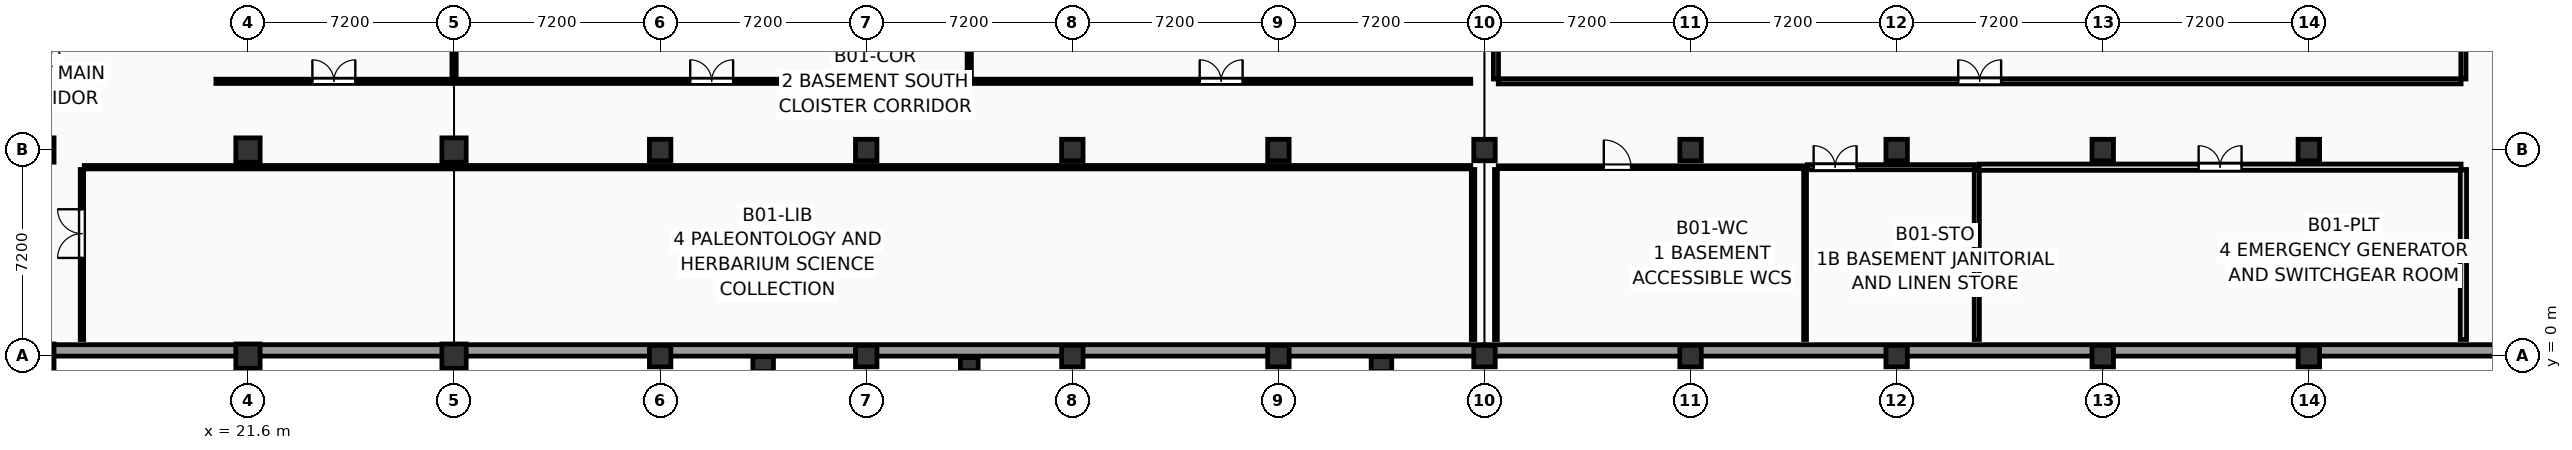
"""IFC4 building model, lengths in metres.
Left out: names, types, materials, properties, quantities, classifications, styles, units other than length and angle.
Written with IfcOpenShell. Run it as: python <this file> out.ifc"""

import sys

from ifc_helpers import new_model, si_unit, direction, frame, frame_2d, origin, origin_2d, place, context, subcontext, project, spatial, rectangle, extrude, element, fill, save


model = new_model("IFC4")
c1 = context("Model", 3, precision=1e-05, world=origin(), true_north=direction((0.0, 1.0)))
c2 = subcontext(c1, "Body", "Model", "MODEL_VIEW")
j1 = project(units=[si_unit("LENGTHUNIT", "METRE"), si_unit("PLANEANGLEUNIT", "RADIAN")], contexts=[c1])
p1 = place(None, origin())
s1 = spatial("IfcSite", under=j1, at=p1, CompositionType="ELEMENT")
p2 = place(p1, origin())
s2 = spatial("IfcBuilding", under=s1, at=p2, CompositionType="ELEMENT")
p3 = place(p2, frame((0.0, 0.0, -4.5)))
s3 = spatial("IfcBuildingStorey", under=s2, at=p3, CompositionType="ELEMENT", Elevation=-4.5)
for number, where, z_axis, x_axis in (
    (1, (14.4, 0.0, -0.3), (0.0, 0.0, 1.0), (1.0, 0.0, 0.0)),
    (2, (14.4, 7.2, -0.3), (0.0, 0.0, 1.0), (1.0, 0.0, 0.0)),
    (3, (21.6, 0.0, -0.3), (0.0, 0.0, 1.0), (1.0, 0.0, 0.0)),
    (4, (21.6, 7.2, -0.3), (0.0, 0.0, 1.0), (1.0, 0.0, 0.0)),
    (5, (28.8, 0.0, -0.3), (0.0, 0.0, 1.0), (1.0, 0.0, 0.0)),
    (6, (28.8, 7.2, -0.3), (0.0, 0.0, 1.0), (1.0, 0.0, 0.0)),
):
    element("IfcColumn", number, at=place(p3, frame(where, z_axis=z_axis, x_axis=x_axis)), inside=s3, PredefinedType="COLUMN", context=c2, shape_type="SweptSolid", body=[
        extrude(rectangle(XDim=0.85, YDim=0.85, at=origin_2d()), origin(), (0.0, 0.0, 1.0), 4.8),
    ])
for number, where, z_axis, x_axis in (
    (7, (36.0, 0.0, -0.3), (0.0, 0.0, 1.0), (1.0, 0.0, 0.0)),
    (8, (36.0, 7.2, -0.3), (0.0, 0.0, 1.0), (1.0, 0.0, 0.0)),
    (9, (43.2, 0.0, -0.3), (0.0, 0.0, 1.0), (1.0, 0.0, 0.0)),
    (10, (43.2, 7.2, -0.3), (0.0, 0.0, 1.0), (1.0, 0.0, 0.0)),
    (11, (50.4, 0.0, -0.3), (0.0, 0.0, 1.0), (1.0, 0.0, 0.0)),
    (12, (50.4, 7.2, -0.3), (0.0, 0.0, 1.0), (1.0, 0.0, 0.0)),
    (13, (57.6, 0.0, -0.3), (0.0, 0.0, 1.0), (1.0, 0.0, 0.0)),
    (14, (57.6, 7.2, -0.3), (0.0, 0.0, 1.0), (1.0, 0.0, 0.0)),
    (15, (64.8, 0.0, -0.3), (0.0, 0.0, 1.0), (1.0, 0.0, 0.0)),
    (16, (64.8, 7.2, -0.3), (0.0, 0.0, 1.0), (1.0, 0.0, 0.0)),
    (17, (72.0, 0.0, -0.3), (0.0, 0.0, 1.0), (1.0, 0.0, 0.0)),
    (18, (72.0, 7.2, -0.3), (0.0, 0.0, 1.0), (1.0, 0.0, 0.0)),
    (19, (79.2, 0.0, -0.3), (0.0, 0.0, 1.0), (1.0, 0.0, 0.0)),
    (20, (79.2, 7.2, -0.3), (0.0, 0.0, 1.0), (1.0, 0.0, 0.0)),
    (21, (86.4, 0.0, -0.3), (0.0, 0.0, 1.0), (1.0, 0.0, 0.0)),
    (22, (86.4, 7.2, -0.3), (0.0, 0.0, 1.0), (1.0, 0.0, 0.0)),
    (23, (93.6, 0.0, -0.3), (0.0, 0.0, 1.0), (1.0, 0.0, 0.0)),
    (24, (93.6, 7.2, -0.3), (0.0, 0.0, 1.0), (1.0, 0.0, 0.0)),
):
    element("IfcColumn", number, at=place(p3, frame(where, z_axis=z_axis, x_axis=x_axis)), inside=s3, PredefinedType="COLUMN", context=c2, shape_type="SweptSolid", body=[
        extrude(rectangle(XDim=0.75, YDim=0.75, at=origin_2d()), origin(), (0.0, 0.0, 1.0), 4.8),
    ])
p4 = place(p3, frame((39.6, -0.28, -0.3), z_axis=(0.0, 0.0, 1.0), x_axis=(0.0, 1.0, 0.0)))
e25 = element("IfcColumn", 25, at=p4, inside=s3, PredefinedType="PILASTER", context=c2, shape_type="SweptSolid", body=[
    extrude(rectangle(XDim=0.52, YDim=0.72, at=origin_2d()), origin(), (0.0, 0.0, 1.0), 4.8),
])
p5 = place(p3, frame((46.8, -0.28, -0.3), z_axis=(0.0, 0.0, 1.0), x_axis=(0.0, 1.0, 0.0)))
e26 = element("IfcColumn", 26, at=p5, inside=s3, PredefinedType="PILASTER", context=c2, shape_type="SweptSolid", body=[
    extrude(rectangle(XDim=0.46, YDim=0.62, at=origin_2d()), origin(), (0.0, 0.0, 1.0), 4.8),
])
p6 = place(p3, frame((61.2, -0.28, -0.3), z_axis=(0.0, 0.0, 1.0), x_axis=(0.0, 1.0, 0.0)))
e27 = element("IfcColumn", 27, at=p6, inside=s3, PredefinedType="PILASTER", context=c2, shape_type="SweptSolid", body=[
    extrude(rectangle(XDim=0.52, YDim=0.72, at=origin_2d()), origin(), (0.0, 0.0, 1.0), 4.8),
])
p7 = place(p3, frame((115.2, 0.2, -0.3), z_axis=(0.0, 0.0, 1.0), x_axis=(-1.0, 0.0, 0.0)))
e28 = element("IfcWall", 28, at=p7, inside=s3, PredefinedType="USERDEFINED", context=c2, shape_type="SweptSolid", body=[
    extrude(rectangle(XDim=50.4, YDim=0.4, at=frame_2d((25.2, 0.0))), origin(), (0.0, 0.0, 1.0), 4.54),
])
p8 = place(p3, frame((64.8, 0.2, -0.3), z_axis=(0.0, 0.0, 1.0), x_axis=(-1.0, 0.0, 0.0)))
e29 = element("IfcWall", 29, at=p8, inside=s3, PredefinedType="USERDEFINED", context=c2, shape_type="SweptSolid", body=[
    extrude(rectangle(XDim=36.0, YDim=0.4, at=frame_2d((18.0, 0.0))), origin(), (0.0, 0.0, 1.0), 4.54),
])
p9 = place(p3, frame((28.8, 0.2, -0.3), z_axis=(0.0, 0.0, 1.0), x_axis=(-1.0, 0.0, 0.0)))
e30 = element("IfcWall", 30, at=p9, inside=s3, PredefinedType="USERDEFINED", context=c2, shape_type="SweptSolid", body=[
    extrude(rectangle(XDim=28.8, YDim=0.4, at=frame_2d((14.4, 0.0))), origin(), (0.0, 0.0, 1.0), 4.54),
])
p10 = place(p3, frame((20.48, 9.6, 0.0), z_axis=(0.0, 0.0, 1.0), x_axis=(1.0, 0.0, 0.0)))
e31 = element("IfcWall", 31, at=p10, inside=s3, PredefinedType="PARTITIONING", context=c2, shape_type="SweptSolid", body=[
    extrude(rectangle(XDim=8.24, YDim=0.15, at=frame_2d((4.12, 0.0))), origin(), (0.0, 0.0, 1.0), 4.225),
])
p11 = place(p10, frame((3.37, 0.0, 0.0)))
e32 = element("IfcOpeningElement", 32, at=p11, cuts=e31, PredefinedType="OPENING", context=c2, shape_type="SweptSolid", body=[
    extrude(rectangle(XDim=1.5, YDim=2.2, at=frame_2d((0.75, 1.1))), frame((0.0, 0.087, 0.0), z_axis=(0.0, -1.0, 0.0), x_axis=(1.0, 0.0, 0.0)), (0.0, 0.0, 1.0), 0.174),
])
p12 = place(p3, frame((28.8, 9.68, 0.0), z_axis=(0.0, 0.0, 1.0), x_axis=(0.0, 1.0, 0.0)))
e33 = element("IfcWall", 33, at=p12, inside=s3, PredefinedType="PARTITIONING", context=c2, shape_type="SweptSolid", body=[
    extrude(rectangle(XDim=17.84, YDim=0.15, at=frame_2d((8.92, 0.0))), origin(), (0.0, 0.0, 1.0), 3.375),
])
p13 = place(p3, frame((28.88, 9.6, 0.0), z_axis=(0.0, 0.0, 1.0), x_axis=(1.0, 0.0, 0.0)))
e34 = element("IfcWall", 34, at=p13, inside=s3, PredefinedType="PARTITIONING", context=c2, shape_type="SweptSolid", body=[
    extrude(rectangle(XDim=17.84, YDim=0.15, at=frame_2d((8.92, 0.0))), origin(), (0.0, 0.0, 1.0), 4.225),
])
p14 = place(p13, frame((8.17, 0.0, 0.0)))
e35 = element("IfcOpeningElement", 35, at=p14, cuts=e34, PredefinedType="OPENING", context=c2, shape_type="SweptSolid", body=[
    extrude(rectangle(XDim=1.5, YDim=2.2, at=frame_2d((0.75, 1.1))), frame((0.0, 0.087, 0.0), z_axis=(0.0, -1.0, 0.0), x_axis=(1.0, 0.0, 0.0)), (0.0, 0.0, 1.0), 0.174),
])
p15 = place(p3, frame((46.8, 9.68, 0.0), z_axis=(0.0, 0.0, 1.0), x_axis=(0.0, 1.0, 0.0)))
e36 = element("IfcWall", 36, at=p15, inside=s3, PredefinedType="PARTITIONING", context=c2, shape_type="SweptSolid", body=[
    extrude(rectangle(XDim=33.44, YDim=0.15, at=frame_2d((16.72, 0.0))), origin(), (0.0, 0.0, 1.0), 4.225),
])
p16 = place(p3, frame((46.88, 9.6, 0.0), z_axis=(0.0, 0.0, 1.0), x_axis=(1.0, 0.0, 0.0)))
e37 = element("IfcWall", 37, at=p16, inside=s3, PredefinedType="PARTITIONING", context=c2, shape_type="SweptSolid", body=[
    extrude(rectangle(XDim=17.44, YDim=0.15, at=frame_2d((8.72, 0.0))), origin(), (0.0, 0.0, 1.0), 4.225),
])
p17 = place(p16, frame((7.97, 0.0, 0.0)))
e38 = element("IfcOpeningElement", 38, at=p17, cuts=e37, PredefinedType="OPENING", context=c2, shape_type="SweptSolid", body=[
    extrude(rectangle(XDim=1.5, YDim=2.2, at=frame_2d((0.75, 1.1))), frame((0.0, 0.087, 0.0), z_axis=(0.0, -1.0, 0.0), x_axis=(1.0, 0.0, 0.0)), (0.0, 0.0, 1.0), 0.174),
])
p18 = place(p3, frame((15.8, 0.58, 0.0), z_axis=(0.0, 0.0, 1.0), x_axis=(0.0, 1.0, 0.0)))
e39 = element("IfcWall", 39, at=p18, inside=s3, PredefinedType="PARTITIONING", context=c2, shape_type="SweptSolid", body=[
    extrude(rectangle(XDim=5.94, YDim=0.12, at=frame_2d((2.97, 0.0))), origin(), (0.0, 0.0, 1.0), 4.225),
])
p19 = place(p18, frame((2.851, 0.0, 0.0)))
e40 = element("IfcOpeningElement", 40, at=p19, cuts=e39, PredefinedType="OPENING", context=c2, shape_type="SweptSolid", body=[
    extrude(rectangle(XDim=1.7, YDim=2.28, at=frame_2d((0.85, 1.14))), frame((0.0, 0.072, 0.0), z_axis=(0.0, -1.0, 0.0), x_axis=(1.0, 0.0, 0.0)), (0.0, 0.0, 1.0), 0.144),
])
p20 = place(p3, frame((64.4, 0.58, 0.0), z_axis=(0.0, 0.0, 1.0), x_axis=(0.0, 1.0, 0.0)))
e41 = element("IfcWall", 41, at=p20, inside=s3, PredefinedType="PARTITIONING", context=c2, shape_type="SweptSolid", body=[
    extrude(rectangle(XDim=5.94, YDim=0.12, at=frame_2d((2.97, 0.0))), origin(), (0.0, 0.0, 1.0), 3.375),
])
p21 = place(p3, frame((15.88, 6.6, 0.0), z_axis=(0.0, 0.0, 1.0), x_axis=(1.0, 0.0, 0.0)))
e42 = element("IfcWall", 42, at=p21, inside=s3, PredefinedType="PARTITIONING", context=c2, shape_type="SweptSolid", body=[
    extrude(rectangle(XDim=48.44, YDim=0.12, at=frame_2d((24.22, 0.0))), origin(), (0.0, 0.0, 1.0), 4.225),
])
p22 = place(p3, frame((65.2, 9.68, 0.0), z_axis=(0.0, 0.0, 1.0), x_axis=(0.0, 1.0, 0.0)))
e43 = element("IfcWall", 43, at=p22, inside=s3, PredefinedType="PARTITIONING", context=c2, shape_type="SweptSolid", body=[
    extrude(rectangle(XDim=18.44, YDim=0.18, at=frame_2d((9.22, 0.0))), origin(), (0.0, 0.0, 1.0), 3.375),
])
p23 = place(p3, frame((65.28, 9.6, 0.0), z_axis=(0.0, 0.0, 1.0), x_axis=(1.0, 0.0, 0.0)))
e44 = element("IfcWall", 44, at=p23, inside=s3, PredefinedType="PARTITIONING", context=c2, shape_type="SweptSolid", body=[
    extrude(rectangle(XDim=33.64, YDim=0.18, at=frame_2d((16.82, 0.0))), origin(), (0.0, 0.0, 1.0), 4.225),
])
p24 = place(p23, frame((16.07, 0.0, 0.0)))
e45 = element("IfcOpeningElement", 45, at=p24, cuts=e44, PredefinedType="OPENING", context=c2, shape_type="SweptSolid", body=[
    extrude(rectangle(XDim=1.5, YDim=2.25, at=frame_2d((0.75, 1.125))), frame((0.0, 0.102, 0.0), z_axis=(0.0, -1.0, 0.0), x_axis=(1.0, 0.0, 0.0)), (0.0, 0.0, 1.0), 0.204),
])
p25 = place(p3, frame((99.0, 9.68, 0.0), z_axis=(0.0, 0.0, 1.0), x_axis=(0.0, 1.0, 0.0)))
e46 = element("IfcWall", 46, at=p25, inside=s3, PredefinedType="PARTITIONING", context=c2, shape_type="SweptSolid", body=[
    extrude(rectangle(XDim=18.44, YDim=0.18, at=frame_2d((9.22, 0.0))), origin(), (0.0, 0.0, 1.0), 4.225),
])
p26 = place(p3, frame((65.2, 0.58, 0.0), z_axis=(0.0, 0.0, 1.0), x_axis=(0.0, 1.0, 0.0)))
e47 = element("IfcWall", 47, at=p26, inside=s3, PredefinedType="PARTITIONING", context=c2, shape_type="SweptSolid", body=[
    extrude(rectangle(XDim=5.94, YDim=0.1, at=frame_2d((2.97, 0.0))), origin(), (0.0, 0.0, 1.0), 3.375),
])
p27 = place(p3, frame((76.0, 0.58, 0.0), z_axis=(0.0, 0.0, 1.0), x_axis=(0.0, 1.0, 0.0)))
e48 = element("IfcWall", 48, at=p27, inside=s3, PredefinedType="PARTITIONING", context=c2, shape_type="SweptSolid", body=[
    extrude(rectangle(XDim=5.94, YDim=0.1, at=frame_2d((2.97, 0.0))), origin(), (0.0, 0.0, 1.0), 4.225),
])
p28 = place(p3, frame((65.28, 6.6, 0.0), z_axis=(0.0, 0.0, 1.0), x_axis=(1.0, 0.0, 0.0)))
e49 = element("IfcWall", 49, at=p28, inside=s3, PredefinedType="PARTITIONING", context=c2, shape_type="SweptSolid", body=[
    extrude(rectangle(XDim=10.64, YDim=0.1, at=frame_2d((5.32, 0.0))), origin(), (0.0, 0.0, 1.0), 4.225),
])
p29 = place(p28, frame((3.689, 0.0, 0.0)))
e50 = element("IfcOpeningElement", 50, at=p29, cuts=e49, PredefinedType="OPENING", context=c2, shape_type="SweptSolid", body=[
    extrude(rectangle(XDim=0.95, YDim=2.1, at=frame_2d((0.475, 1.05))), frame((0.0, 0.062, 0.0), z_axis=(0.0, -1.0, 0.0), x_axis=(1.0, 0.0, 0.0)), (0.0, 0.0, 1.0), 0.124),
])
p30 = place(p3, frame((82.0, 0.58, 0.0), z_axis=(0.0, 0.0, 1.0), x_axis=(0.0, 1.0, 0.0)))
e51 = element("IfcWall", 51, at=p30, inside=s3, PredefinedType="PARTITIONING", context=c2, shape_type="SweptSolid", body=[
    extrude(rectangle(XDim=5.94, YDim=0.18, at=frame_2d((2.97, 0.0))), origin(), (0.0, 0.0, 1.0), 4.225),
])
p31 = place(p3, frame((76.08, 6.6, 0.0), z_axis=(0.0, 0.0, 1.0), x_axis=(1.0, 0.0, 0.0)))
e52 = element("IfcWall", 52, at=p31, inside=s3, PredefinedType="PARTITIONING", context=c2, shape_type="SweptSolid", body=[
    extrude(rectangle(XDim=5.84, YDim=0.18, at=frame_2d((2.92, 0.0))), origin(), (0.0, 0.0, 1.0), 4.225),
])
p32 = place(p31, frame((0.22, 0.0, 0.0)))
e53 = element("IfcOpeningElement", 53, at=p32, cuts=e52, PredefinedType="OPENING", context=c2, shape_type="SweptSolid", body=[
    extrude(rectangle(XDim=1.5, YDim=2.25, at=frame_2d((0.75, 1.125))), frame((0.0, 0.102, 0.0), z_axis=(0.0, -1.0, 0.0), x_axis=(1.0, 0.0, 0.0)), (0.0, 0.0, 1.0), 0.204),
])
p33 = place(p3, frame((99.0, 0.58, 0.0), z_axis=(0.0, 0.0, 1.0), x_axis=(0.0, 1.0, 0.0)))
e54 = element("IfcWall", 54, at=p33, inside=s3, PredefinedType="PARTITIONING", context=c2, shape_type="SweptSolid", body=[
    extrude(rectangle(XDim=5.94, YDim=0.22, at=frame_2d((2.97, 0.0))), origin(), (0.0, 0.0, 1.0), 4.225),
])
p34 = place(p3, frame((82.08, 6.6, 0.0), z_axis=(0.0, 0.0, 1.0), x_axis=(1.0, 0.0, 0.0)))
e55 = element("IfcWall", 55, at=p34, inside=s3, PredefinedType="PARTITIONING", context=c2, shape_type="SweptSolid", body=[
    extrude(rectangle(XDim=16.84, YDim=0.22, at=frame_2d((8.42, 0.0))), origin(), (0.0, 0.0, 1.0), 4.225),
])
p35 = place(p34, frame((7.67, 0.0, 0.0)))
e56 = element("IfcOpeningElement", 56, at=p35, cuts=e55, PredefinedType="OPENING", context=c2, shape_type="SweptSolid", body=[
    extrude(rectangle(XDim=1.5, YDim=2.25, at=frame_2d((0.75, 1.125))), frame((0.0, 0.122, 0.0), z_axis=(0.0, -1.0, 0.0), x_axis=(1.0, 0.0, 0.0)), (0.0, 0.0, 1.0), 0.244),
])
p36 = place(p11, origin())
e57 = element("IfcDoor", 57, at=p36, inside=s3, OperationType="DOUBLE_DOOR_SINGLE_SWING", PredefinedType="DOOR", context=c2, shape_type="SweptSolid", body=[
    extrude(rectangle(XDim=1.5, YDim=2.2, at=frame_2d((0.75, 1.1))), frame((0.0, 0.025, 0.0), z_axis=(0.0, -1.0, 0.0), x_axis=(1.0, 0.0, 0.0)), (0.0, 0.0, 1.0), 0.05),
])
fill(e32, e57)
p37 = place(p14, origin())
e58 = element("IfcDoor", 58, at=p37, inside=s3, OperationType="DOUBLE_DOOR_SINGLE_SWING", PredefinedType="DOOR", context=c2, shape_type="SweptSolid", body=[
    extrude(rectangle(XDim=1.5, YDim=2.2, at=frame_2d((0.75, 1.1))), frame((0.0, 0.025, 0.0), z_axis=(0.0, -1.0, 0.0), x_axis=(1.0, 0.0, 0.0)), (0.0, 0.0, 1.0), 0.05),
])
fill(e35, e58)
p38 = place(p17, origin())
e59 = element("IfcDoor", 59, at=p38, inside=s3, OperationType="DOUBLE_DOOR_SINGLE_SWING", PredefinedType="DOOR", context=c2, shape_type="SweptSolid", body=[
    extrude(rectangle(XDim=1.5, YDim=2.2, at=frame_2d((0.75, 1.1))), frame((0.0, 0.025, 0.0), z_axis=(0.0, -1.0, 0.0), x_axis=(1.0, 0.0, 0.0)), (0.0, 0.0, 1.0), 0.05),
])
fill(e38, e59)
p39 = place(p19, origin())
e60 = element("IfcDoor", 60, at=p39, inside=s3, OperationType="DOUBLE_DOOR_SINGLE_SWING", PredefinedType="DOOR", context=c2, shape_type="SweptSolid", body=[
    extrude(rectangle(XDim=1.7, YDim=2.28, at=frame_2d((0.85, 1.14))), frame((0.0, 0.025, 0.0), z_axis=(0.0, -1.0, 0.0), x_axis=(1.0, 0.0, 0.0)), (0.0, 0.0, 1.0), 0.05),
])
fill(e40, e60)
p40 = place(p24, origin())
e61 = element("IfcDoor", 61, at=p40, inside=s3, OperationType="DOUBLE_DOOR_SINGLE_SWING", PredefinedType="DOOR", context=c2, shape_type="SweptSolid", body=[
    extrude(rectangle(XDim=1.5, YDim=2.25, at=frame_2d((0.75, 1.125))), frame((0.0, 0.025, 0.0), z_axis=(0.0, -1.0, 0.0), x_axis=(1.0, 0.0, 0.0)), (0.0, 0.0, 1.0), 0.05),
])
fill(e45, e61)
p41 = place(p29, origin())
e62 = element("IfcDoor", 62, at=p41, inside=s3, OperationType="SINGLE_SWING_LEFT", PredefinedType="DOOR", context=c2, shape_type="SweptSolid", body=[
    extrude(rectangle(XDim=0.95, YDim=2.1, at=frame_2d((0.475, 1.05))), frame((0.0, 0.025, 0.0), z_axis=(0.0, -1.0, 0.0), x_axis=(1.0, 0.0, 0.0)), (0.0, 0.0, 1.0), 0.05),
])
fill(e50, e62)
p42 = place(p32, origin())
e63 = element("IfcDoor", 63, at=p42, inside=s3, OperationType="DOUBLE_DOOR_SINGLE_SWING", PredefinedType="DOOR", context=c2, shape_type="SweptSolid", body=[
    extrude(rectangle(XDim=1.5, YDim=2.25, at=frame_2d((0.75, 1.125))), frame((0.0, 0.025, 0.0), z_axis=(0.0, -1.0, 0.0), x_axis=(1.0, 0.0, 0.0)), (0.0, 0.0, 1.0), 0.05),
])
fill(e53, e63)
p43 = place(p35, origin())
e64 = element("IfcDoor", 64, at=p43, inside=s3, OperationType="DOUBLE_DOOR_SINGLE_SWING", PredefinedType="DOOR", context=c2, shape_type="SweptSolid", body=[
    extrude(rectangle(XDim=1.5, YDim=2.25, at=frame_2d((0.75, 1.125))), frame((0.0, 0.025, 0.0), z_axis=(0.0, -1.0, 0.0), x_axis=(1.0, 0.0, 0.0)), (0.0, 0.0, 1.0), 0.05),
])
fill(e56, e64)
save(model, sys.argv[1])
